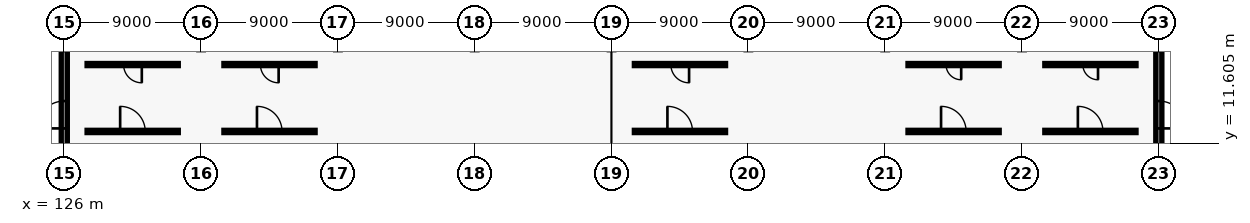
"""IFC4 building model, lengths in metres.
Left out: names, types, materials, properties, quantities, classifications, styles, units other than length and angle.
Written with IfcOpenShell. Run it as: python <this file> out.ifc"""

import sys

from ifc_helpers import new_model, si_unit, direction, frame, frame_2d, origin, place, context, subcontext, project, spatial, rectangle, extrude, element, fill, save


model = new_model("IFC4")
c1 = context("Model", 3, precision=1e-05, world=origin(), true_north=direction((0.0, 1.0)))
c2 = subcontext(c1, "Body", "Model", "MODEL_VIEW")
j1 = project(units=[si_unit("LENGTHUNIT", "METRE"), si_unit("PLANEANGLEUNIT", "RADIAN")], contexts=[c1])
p1 = place(None, origin())
s1 = spatial("IfcSite", under=j1, at=p1, CompositionType="ELEMENT")
p2 = place(p1, origin())
s2 = spatial("IfcBuilding", under=s1, at=p2, CompositionType="ELEMENT")
p3 = place(p2, origin())
s3 = spatial("IfcBuildingStorey", under=s2, at=p3, CompositionType="ELEMENT", Elevation=0.0)
p4 = place(p3, frame((126.0, 9.06, 0.0), z_axis=(0.0, 0.0, 1.0), x_axis=(0.0, 1.0, 0.0)))
e1 = element("IfcWall", 1, at=p4, inside=s3, PredefinedType="SOLIDWALL", context=c2, shape_type="SweptSolid", body=[
    extrude(rectangle(XDim=8.88, YDim=0.4, at=frame_2d((4.44, 0.0))), origin(), (0.0, 0.0, 1.0), 4.7),
])
p5 = place(p4, frame((3.54, 0.0, 0.0)))
e2 = element("IfcOpeningElement", 2, at=p5, cuts=e1, PredefinedType="OPENING", context=c2, shape_type="SweptSolid", body=[
    extrude(rectangle(XDim=1.8, YDim=2.2, at=frame_2d((0.9, 1.1))), frame((0.0, 0.21, 0.0), z_axis=(0.0, -1.0, 0.0), x_axis=(1.0, 0.0, 0.0)), (0.0, 0.0, 1.0), 0.42),
])
p6 = place(p3, frame((198.0, 9.06, 0.0), z_axis=(0.0, 0.0, 1.0), x_axis=(0.0, 1.0, 0.0)))
e3 = element("IfcWall", 3, at=p6, inside=s3, PredefinedType="SOLIDWALL", context=c2, shape_type="SweptSolid", body=[
    extrude(rectangle(XDim=8.88, YDim=0.4, at=frame_2d((4.44, 0.0))), origin(), (0.0, 0.0, 1.0), 4.7),
])
p7 = place(p6, frame((3.54, 0.0, 0.0)))
e4 = element("IfcOpeningElement", 4, at=p7, cuts=e3, PredefinedType="OPENING", context=c2, shape_type="SweptSolid", body=[
    extrude(rectangle(XDim=1.8, YDim=2.2, at=frame_2d((0.9, 1.1))), frame((0.0, 0.21, 0.0), z_axis=(0.0, -1.0, 0.0), x_axis=(1.0, 0.0, 0.0)), (0.0, 0.0, 1.0), 0.42),
])
p8 = place(p3, frame((127.5, 12.4, 0.0), z_axis=(0.0, 0.0, 1.0), x_axis=(1.0, 0.0, 0.0)))
e5 = element("IfcWall", 5, at=p8, inside=s3, PredefinedType="PARTITIONING", context=c2, shape_type="SweptSolid", body=[
    extrude(rectangle(XDim=6.0, YDim=0.15, at=frame_2d((3.0, 0.0))), origin(), (0.0, 0.0, 1.0), 4.3),
])
p9 = place(p8, frame((2.175, 0.0, 0.0)))
e6 = element("IfcOpeningElement", 6, at=p9, cuts=e5, PredefinedType="OPENING", context=c2, shape_type="SweptSolid", body=[
    extrude(rectangle(XDim=1.65, YDim=2.25, at=frame_2d((0.825, 1.125))), frame((0.0, 0.085, 0.0), z_axis=(0.0, -1.0, 0.0), x_axis=(1.0, 0.0, 0.0)), (0.0, 0.0, 1.0), 0.17),
])
p10 = place(p3, frame((127.5, 16.8, 0.0), z_axis=(0.0, 0.0, 1.0), x_axis=(1.0, 0.0, 0.0)))
e7 = element("IfcWall", 7, at=p10, inside=s3, PredefinedType="PARTITIONING", context=c2, shape_type="SweptSolid", body=[
    extrude(rectangle(XDim=6.0, YDim=0.14, at=frame_2d((3.0, 0.0))), origin(), (0.0, 0.0, 1.0), 4.3),
])
p11 = place(p10, frame((2.4, 0.0, 0.0)))
e8 = element("IfcOpeningElement", 8, at=p11, cuts=e7, PredefinedType="OPENING", context=c2, shape_type="SweptSolid", body=[
    extrude(rectangle(XDim=1.2, YDim=2.2, at=frame_2d((0.6, 1.1))), frame((0.0, 0.08, 0.0), z_axis=(0.0, -1.0, 0.0), x_axis=(1.0, 0.0, 0.0)), (0.0, 0.0, 1.0), 0.16),
])
p12 = place(p3, frame((136.5, 12.4, 0.0), z_axis=(0.0, 0.0, 1.0), x_axis=(1.0, 0.0, 0.0)))
e9 = element("IfcWall", 9, at=p12, inside=s3, PredefinedType="PARTITIONING", context=c2, shape_type="SweptSolid", body=[
    extrude(rectangle(XDim=6.0, YDim=0.15, at=frame_2d((3.0, 0.0))), origin(), (0.0, 0.0, 1.0), 4.3),
])
p13 = place(p12, frame((2.175, 0.0, 0.0)))
e10 = element("IfcOpeningElement", 10, at=p13, cuts=e9, PredefinedType="OPENING", context=c2, shape_type="SweptSolid", body=[
    extrude(rectangle(XDim=1.65, YDim=2.25, at=frame_2d((0.825, 1.125))), frame((0.0, 0.085, 0.0), z_axis=(0.0, -1.0, 0.0), x_axis=(1.0, 0.0, 0.0)), (0.0, 0.0, 1.0), 0.17),
])
p14 = place(p3, frame((136.5, 16.8, 0.0), z_axis=(0.0, 0.0, 1.0), x_axis=(1.0, 0.0, 0.0)))
e11 = element("IfcWall", 11, at=p14, inside=s3, PredefinedType="PARTITIONING", context=c2, shape_type="SweptSolid", body=[
    extrude(rectangle(XDim=6.0, YDim=0.14, at=frame_2d((3.0, 0.0))), origin(), (0.0, 0.0, 1.0), 4.3),
])
p15 = place(p14, frame((2.4, 0.0, 0.0)))
e12 = element("IfcOpeningElement", 12, at=p15, cuts=e11, PredefinedType="OPENING", context=c2, shape_type="SweptSolid", body=[
    extrude(rectangle(XDim=1.2, YDim=2.2, at=frame_2d((0.6, 1.1))), frame((0.0, 0.08, 0.0), z_axis=(0.0, -1.0, 0.0), x_axis=(1.0, 0.0, 0.0)), (0.0, 0.0, 1.0), 0.16),
])
p16 = place(p3, frame((163.5, 12.4, 0.0), z_axis=(0.0, 0.0, 1.0), x_axis=(1.0, 0.0, 0.0)))
e13 = element("IfcWall", 13, at=p16, inside=s3, PredefinedType="PARTITIONING", context=c2, shape_type="SweptSolid", body=[
    extrude(rectangle(XDim=6.0, YDim=0.15, at=frame_2d((3.0, 0.0))), origin(), (0.0, 0.0, 1.0), 4.3),
])
p17 = place(p16, frame((2.175, 0.0, 0.0)))
e14 = element("IfcOpeningElement", 14, at=p17, cuts=e13, PredefinedType="OPENING", context=c2, shape_type="SweptSolid", body=[
    extrude(rectangle(XDim=1.65, YDim=2.25, at=frame_2d((0.825, 1.125))), frame((0.0, 0.085, 0.0), z_axis=(0.0, -1.0, 0.0), x_axis=(1.0, 0.0, 0.0)), (0.0, 0.0, 1.0), 0.17),
])
p18 = place(p3, frame((163.5, 16.8, 0.0), z_axis=(0.0, 0.0, 1.0), x_axis=(1.0, 0.0, 0.0)))
e15 = element("IfcWall", 15, at=p18, inside=s3, PredefinedType="PARTITIONING", context=c2, shape_type="SweptSolid", body=[
    extrude(rectangle(XDim=6.0, YDim=0.14, at=frame_2d((3.0, 0.0))), origin(), (0.0, 0.0, 1.0), 4.3),
])
p19 = place(p18, frame((2.4, 0.0, 0.0)))
e16 = element("IfcOpeningElement", 16, at=p19, cuts=e15, PredefinedType="OPENING", context=c2, shape_type="SweptSolid", body=[
    extrude(rectangle(XDim=1.2, YDim=2.2, at=frame_2d((0.6, 1.1))), frame((0.0, 0.08, 0.0), z_axis=(0.0, -1.0, 0.0), x_axis=(1.0, 0.0, 0.0)), (0.0, 0.0, 1.0), 0.16),
])
p20 = place(p3, frame((181.5, 12.4, 0.0), z_axis=(0.0, 0.0, 1.0), x_axis=(1.0, 0.0, 0.0)))
e17 = element("IfcWall", 17, at=p20, inside=s3, PredefinedType="PARTITIONING", context=c2, shape_type="SweptSolid", body=[
    extrude(rectangle(XDim=6.0, YDim=0.15, at=frame_2d((3.0, 0.0))), origin(), (0.0, 0.0, 1.0), 4.3),
])
p21 = place(p20, frame((2.175, 0.0, 0.0)))
e18 = element("IfcOpeningElement", 18, at=p21, cuts=e17, PredefinedType="OPENING", context=c2, shape_type="SweptSolid", body=[
    extrude(rectangle(XDim=1.65, YDim=2.25, at=frame_2d((0.825, 1.125))), frame((0.0, 0.085, 0.0), z_axis=(0.0, -1.0, 0.0), x_axis=(1.0, 0.0, 0.0)), (0.0, 0.0, 1.0), 0.17),
])
p22 = place(p3, frame((181.5, 16.8, 0.0), z_axis=(0.0, 0.0, 1.0), x_axis=(1.0, 0.0, 0.0)))
e19 = element("IfcWall", 19, at=p22, inside=s3, PredefinedType="PARTITIONING", context=c2, shape_type="SweptSolid", body=[
    extrude(rectangle(XDim=6.0, YDim=0.14, at=frame_2d((3.0, 0.0))), origin(), (0.0, 0.0, 1.0), 4.3),
])
p23 = place(p22, frame((2.5, 0.0, 0.0)))
e20 = element("IfcOpeningElement", 20, at=p23, cuts=e19, PredefinedType="OPENING", context=c2, shape_type="SweptSolid", body=[
    extrude(rectangle(XDim=1.0, YDim=2.1, at=frame_2d((0.5, 1.05))), frame((0.0, 0.08, 0.0), z_axis=(0.0, -1.0, 0.0), x_axis=(1.0, 0.0, 0.0)), (0.0, 0.0, 1.0), 0.16),
])
p24 = place(p3, frame((190.5, 12.4, 0.0), z_axis=(0.0, 0.0, 1.0), x_axis=(1.0, 0.0, 0.0)))
e21 = element("IfcWall", 21, at=p24, inside=s3, PredefinedType="PARTITIONING", context=c2, shape_type="SweptSolid", body=[
    extrude(rectangle(XDim=6.0, YDim=0.15, at=frame_2d((3.0, 0.0))), origin(), (0.0, 0.0, 1.0), 4.3),
])
p25 = place(p24, frame((2.175, 0.0, 0.0)))
e22 = element("IfcOpeningElement", 22, at=p25, cuts=e21, PredefinedType="OPENING", context=c2, shape_type="SweptSolid", body=[
    extrude(rectangle(XDim=1.65, YDim=2.25, at=frame_2d((0.825, 1.125))), frame((0.0, 0.085, 0.0), z_axis=(0.0, -1.0, 0.0), x_axis=(1.0, 0.0, 0.0)), (0.0, 0.0, 1.0), 0.17),
])
p26 = place(p3, frame((190.5, 16.8, 0.0), z_axis=(0.0, 0.0, 1.0), x_axis=(1.0, 0.0, 0.0)))
e23 = element("IfcWall", 23, at=p26, inside=s3, PredefinedType="PARTITIONING", context=c2, shape_type="SweptSolid", body=[
    extrude(rectangle(XDim=6.0, YDim=0.14, at=frame_2d((3.0, 0.0))), origin(), (0.0, 0.0, 1.0), 4.3),
])
p27 = place(p26, frame((2.5, 0.0, 0.0)))
e24 = element("IfcOpeningElement", 24, at=p27, cuts=e23, PredefinedType="OPENING", context=c2, shape_type="SweptSolid", body=[
    extrude(rectangle(XDim=1.0, YDim=2.1, at=frame_2d((0.5, 1.05))), frame((0.0, 0.08, 0.0), z_axis=(0.0, -1.0, 0.0), x_axis=(1.0, 0.0, 0.0)), (0.0, 0.0, 1.0), 0.16),
])
p28 = place(p5, origin())
e25 = element("IfcDoor", 25, at=p28, inside=s3, OperationType="DOUBLE_DOOR_SINGLE_SWING", PredefinedType="DOOR", context=c2, shape_type="SweptSolid", body=[
    extrude(rectangle(XDim=1.8, YDim=2.2, at=frame_2d((0.9, 1.1))), frame((0.0, 0.025, 0.0), z_axis=(0.0, -1.0, 0.0), x_axis=(1.0, 0.0, 0.0)), (0.0, 0.0, 1.0), 0.05),
])
fill(e2, e25)
p29 = place(p7, frame((1.8, 0.0, 0.0), z_axis=(0.0, 0.0, 1.0), x_axis=(-1.0, 0.0, 0.0)))
e26 = element("IfcDoor", 26, at=p29, inside=s3, OperationType="DOUBLE_DOOR_SINGLE_SWING", PredefinedType="DOOR", context=c2, shape_type="SweptSolid", body=[
    extrude(rectangle(XDim=1.8, YDim=2.2, at=frame_2d((0.9, 1.1))), frame((0.0, 0.025, 0.0), z_axis=(0.0, -1.0, 0.0), x_axis=(1.0, 0.0, 0.0)), (0.0, 0.0, 1.0), 0.05),
])
fill(e4, e26)
p30 = place(p9, origin())
e27 = element("IfcDoor", 27, at=p30, inside=s3, OperationType="DOUBLE_DOOR_SINGLE_SWING", PredefinedType="DOOR", context=c2, shape_type="SweptSolid", body=[
    extrude(rectangle(XDim=1.65, YDim=2.25, at=frame_2d((0.825, 1.125))), frame((0.0, 0.025, 0.0), z_axis=(0.0, -1.0, 0.0), x_axis=(1.0, 0.0, 0.0)), (0.0, 0.0, 1.0), 0.05),
])
fill(e6, e27)
p31 = place(p11, origin())
e28 = element("IfcDoor", 28, at=p31, inside=s3, OperationType="SINGLE_SWING_RIGHT", PredefinedType="DOOR", context=c2, shape_type="SweptSolid", body=[
    extrude(rectangle(XDim=1.2, YDim=2.2, at=frame_2d((0.6, 1.1))), frame((0.0, 0.025, 0.0), z_axis=(0.0, -1.0, 0.0), x_axis=(1.0, 0.0, 0.0)), (0.0, 0.0, 1.0), 0.05),
])
fill(e8, e28)
p32 = place(p13, origin())
e29 = element("IfcDoor", 29, at=p32, inside=s3, OperationType="DOUBLE_DOOR_SINGLE_SWING", PredefinedType="DOOR", context=c2, shape_type="SweptSolid", body=[
    extrude(rectangle(XDim=1.65, YDim=2.25, at=frame_2d((0.825, 1.125))), frame((0.0, 0.025, 0.0), z_axis=(0.0, -1.0, 0.0), x_axis=(1.0, 0.0, 0.0)), (0.0, 0.0, 1.0), 0.05),
])
fill(e10, e29)
p33 = place(p15, origin())
e30 = element("IfcDoor", 30, at=p33, inside=s3, OperationType="SINGLE_SWING_RIGHT", PredefinedType="DOOR", context=c2, shape_type="SweptSolid", body=[
    extrude(rectangle(XDim=1.2, YDim=2.2, at=frame_2d((0.6, 1.1))), frame((0.0, 0.025, 0.0), z_axis=(0.0, -1.0, 0.0), x_axis=(1.0, 0.0, 0.0)), (0.0, 0.0, 1.0), 0.05),
])
fill(e12, e30)
p34 = place(p17, origin())
e31 = element("IfcDoor", 31, at=p34, inside=s3, OperationType="DOUBLE_DOOR_SINGLE_SWING", PredefinedType="DOOR", context=c2, shape_type="SweptSolid", body=[
    extrude(rectangle(XDim=1.65, YDim=2.25, at=frame_2d((0.825, 1.125))), frame((0.0, 0.025, 0.0), z_axis=(0.0, -1.0, 0.0), x_axis=(1.0, 0.0, 0.0)), (0.0, 0.0, 1.0), 0.05),
])
fill(e14, e31)
p35 = place(p19, origin())
e32 = element("IfcDoor", 32, at=p35, inside=s3, OperationType="SINGLE_SWING_RIGHT", PredefinedType="DOOR", context=c2, shape_type="SweptSolid", body=[
    extrude(rectangle(XDim=1.2, YDim=2.2, at=frame_2d((0.6, 1.1))), frame((0.0, 0.025, 0.0), z_axis=(0.0, -1.0, 0.0), x_axis=(1.0, 0.0, 0.0)), (0.0, 0.0, 1.0), 0.05),
])
fill(e16, e32)
p36 = place(p21, origin())
e33 = element("IfcDoor", 33, at=p36, inside=s3, OperationType="DOUBLE_DOOR_SINGLE_SWING", PredefinedType="DOOR", context=c2, shape_type="SweptSolid", body=[
    extrude(rectangle(XDim=1.65, YDim=2.25, at=frame_2d((0.825, 1.125))), frame((0.0, 0.025, 0.0), z_axis=(0.0, -1.0, 0.0), x_axis=(1.0, 0.0, 0.0)), (0.0, 0.0, 1.0), 0.05),
])
fill(e18, e33)
p37 = place(p23, origin())
e34 = element("IfcDoor", 34, at=p37, inside=s3, OperationType="SINGLE_SWING_RIGHT", PredefinedType="DOOR", context=c2, shape_type="SweptSolid", body=[
    extrude(rectangle(XDim=1.0, YDim=2.1, at=frame_2d((0.5, 1.05))), frame((0.0, 0.025, 0.0), z_axis=(0.0, -1.0, 0.0), x_axis=(1.0, 0.0, 0.0)), (0.0, 0.0, 1.0), 0.05),
])
fill(e20, e34)
p38 = place(p25, origin())
e35 = element("IfcDoor", 35, at=p38, inside=s3, OperationType="DOUBLE_DOOR_SINGLE_SWING", PredefinedType="DOOR", context=c2, shape_type="SweptSolid", body=[
    extrude(rectangle(XDim=1.65, YDim=2.25, at=frame_2d((0.825, 1.125))), frame((0.0, 0.025, 0.0), z_axis=(0.0, -1.0, 0.0), x_axis=(1.0, 0.0, 0.0)), (0.0, 0.0, 1.0), 0.05),
])
fill(e22, e35)
p39 = place(p27, origin())
e36 = element("IfcDoor", 36, at=p39, inside=s3, OperationType="SINGLE_SWING_RIGHT", PredefinedType="DOOR", context=c2, shape_type="SweptSolid", body=[
    extrude(rectangle(XDim=1.0, YDim=2.1, at=frame_2d((0.5, 1.05))), frame((0.0, 0.025, 0.0), z_axis=(0.0, -1.0, 0.0), x_axis=(1.0, 0.0, 0.0)), (0.0, 0.0, 1.0), 0.05),
])
fill(e24, e36)
save(model, sys.argv[1])
